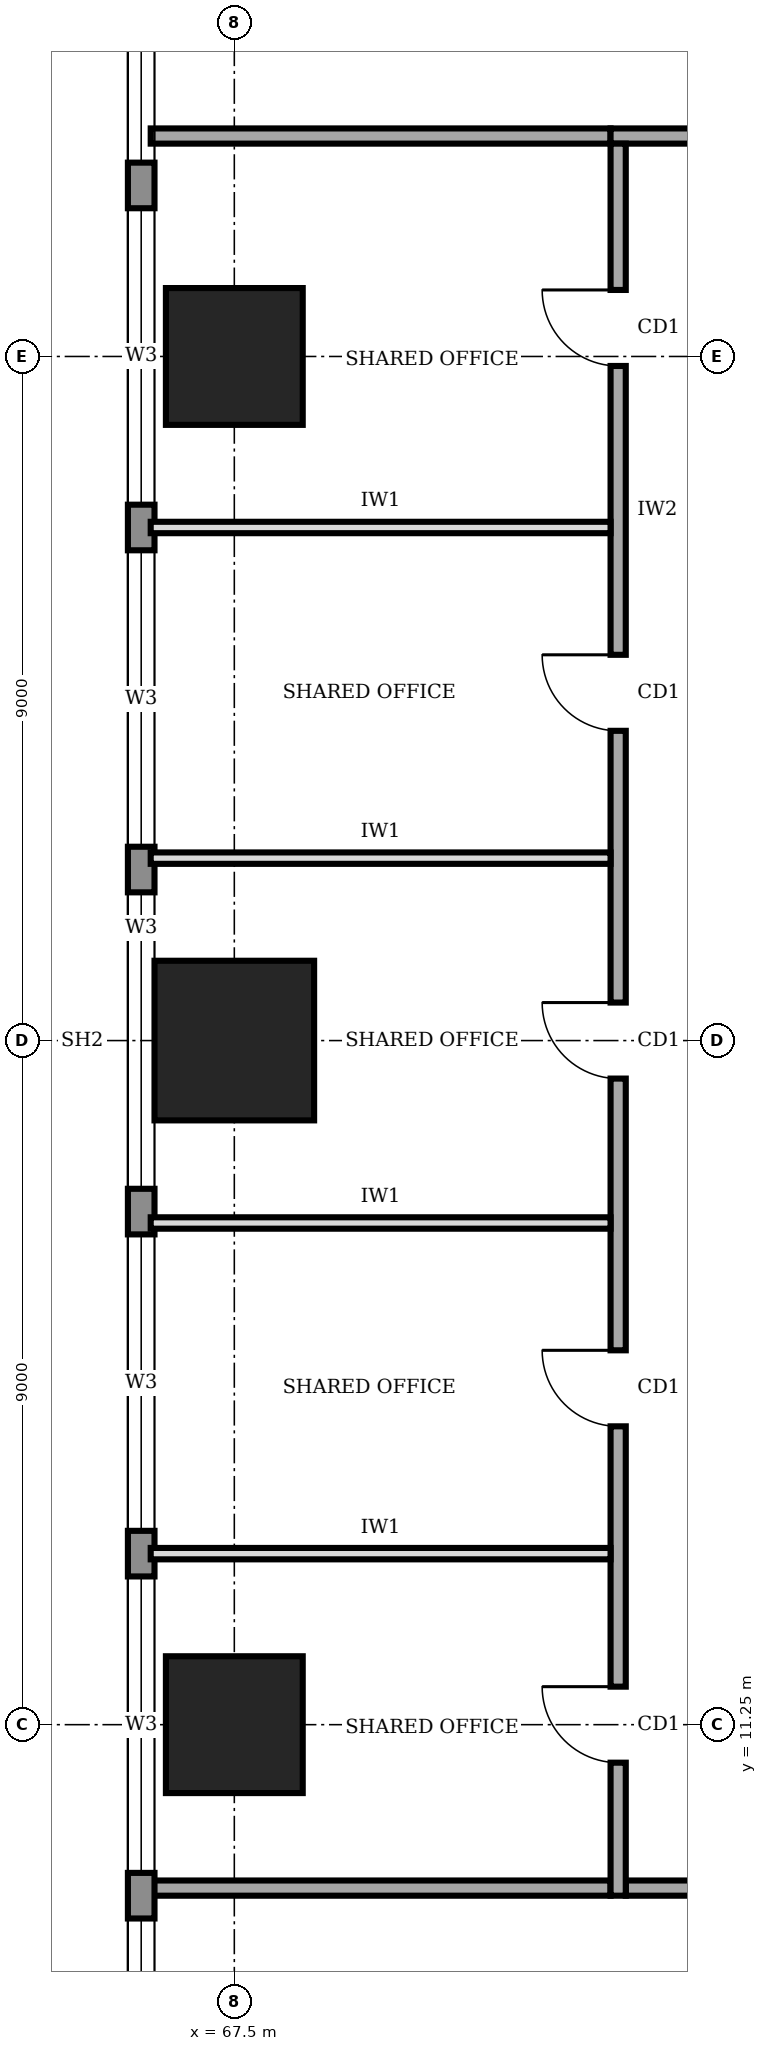
"""IFC4 building model, lengths in metres.
Left out: names, types, materials, properties, quantities, classifications, styles, units other than length and angle.
Written with IfcOpenShell. Run it as: python <this file> out.ifc"""

import sys

from ifc_helpers import new_model, si_unit, direction, frame, frame_2d, origin, origin_2d, place, context, subcontext, project, spatial, rectangle, extrude, element, fill, save


model = new_model("IFC4")
c1 = context("Model", 3, precision=1e-05, world=origin(), true_north=direction((0.0, 1.0)))
c2 = subcontext(c1, "Body", "Model", "MODEL_VIEW")
j1 = project(units=[si_unit("LENGTHUNIT", "METRE"), si_unit("PLANEANGLEUNIT", "RADIAN")], contexts=[c1])
p1 = place(None, origin())
s1 = spatial("IfcSite", under=j1, at=p1, CompositionType="ELEMENT")
p2 = place(p1, origin())
s2 = spatial("IfcBuilding", under=s1, at=p2, CompositionType="ELEMENT")
p3 = place(p2, frame((0.0, 0.0, 185.0)))
s3 = spatial("IfcBuildingStorey", under=s2, at=p3, CompositionType="ELEMENT", Elevation=185.0)
p4 = place(p3, frame((67.5, 11.25, 0.0), z_axis=(0.0, 0.0, 1.0), x_axis=(1.0, 0.0, 0.0)))
e1 = element("IfcColumn", 1, at=p4, inside=s3, PredefinedType="COLUMN", context=c2, shape_type="SweptSolid", body=[
    extrude(rectangle(XDim=1.8, YDim=1.8, at=origin_2d()), origin(), (0.0, 0.0, 1.0), 4.0),
])
p5 = place(p3, frame((67.5, 20.25, 0.0), z_axis=(0.0, 0.0, 1.0), x_axis=(1.0, 0.0, 0.0)))
e2 = element("IfcColumn", 2, at=p5, inside=s3, PredefinedType="COLUMN", context=c2, shape_type="SweptSolid", body=[
    extrude(rectangle(XDim=2.1, YDim=2.1, at=origin_2d()), origin(), (0.0, 0.0, 1.0), 4.0),
])
p6 = place(p3, frame((67.5, 29.25, 0.0), z_axis=(0.0, 0.0, 1.0), x_axis=(1.0, 0.0, 0.0)))
e3 = element("IfcColumn", 3, at=p6, inside=s3, PredefinedType="COLUMN", context=c2, shape_type="SweptSolid", body=[
    extrude(rectangle(XDim=1.8, YDim=1.8, at=origin_2d()), origin(), (0.0, 0.0, 1.0), 4.0),
])
p7 = place(p3, frame((66.275, 37.18, 0.0), z_axis=(0.0, 0.0, 1.0), x_axis=(0.0, -1.0, 0.0)))
e4 = element("IfcWall", 4, at=p7, inside=s3, PredefinedType="STANDARD", context=c2, shape_type="SweptSolid", body=[
    extrude(rectangle(XDim=33.86, YDim=0.35, at=frame_2d((16.93, 0.0))), origin(), (0.0, 0.0, 1.0), 3.75),
])
p8 = place(p7, frame((28.48, 0.0, 0.95)))
e5 = element("IfcOpeningElement", 5, at=p8, cuts=e4, PredefinedType="OPENING", context=c2, shape_type="SweptSolid", body=[
    extrude(rectangle(XDim=3.9, YDim=1.8, at=frame_2d((1.95, 0.9))), frame((0.0, 0.185, 0.0), z_axis=(0.0, -1.0, 0.0), x_axis=(1.0, 0.0, 0.0)), (0.0, 0.0, 1.0), 0.37),
])
p9 = place(p7, frame((23.98, 0.0, 0.95)))
e6 = element("IfcOpeningElement", 6, at=p9, cuts=e4, PredefinedType="OPENING", context=c2, shape_type="SweptSolid", body=[
    extrude(rectangle(XDim=3.9, YDim=1.8, at=frame_2d((1.95, 0.9))), frame((0.0, 0.185, 0.0), z_axis=(0.0, -1.0, 0.0), x_axis=(1.0, 0.0, 0.0)), (0.0, 0.0, 1.0), 0.37),
])
p10 = place(p7, frame((19.48, 0.0, 0.95)))
e7 = element("IfcOpeningElement", 7, at=p10, cuts=e4, PredefinedType="OPENING", context=c2, shape_type="SweptSolid", body=[
    extrude(rectangle(XDim=3.9, YDim=1.8, at=frame_2d((1.95, 0.9))), frame((0.0, 0.185, 0.0), z_axis=(0.0, -1.0, 0.0), x_axis=(1.0, 0.0, 0.0)), (0.0, 0.0, 1.0), 0.37),
])
p11 = place(p7, frame((14.98, 0.0, 0.95)))
e8 = element("IfcOpeningElement", 8, at=p11, cuts=e4, PredefinedType="OPENING", context=c2, shape_type="SweptSolid", body=[
    extrude(rectangle(XDim=3.9, YDim=1.8, at=frame_2d((1.95, 0.9))), frame((0.0, 0.185, 0.0), z_axis=(0.0, -1.0, 0.0), x_axis=(1.0, 0.0, 0.0)), (0.0, 0.0, 1.0), 0.37),
])
p12 = place(p7, frame((10.48, 0.0, 0.95)))
e9 = element("IfcOpeningElement", 9, at=p12, cuts=e4, PredefinedType="OPENING", context=c2, shape_type="SweptSolid", body=[
    extrude(rectangle(XDim=3.9, YDim=1.8, at=frame_2d((1.95, 0.9))), frame((0.0, 0.185, 0.0), z_axis=(0.0, -1.0, 0.0), x_axis=(1.0, 0.0, 0.0)), (0.0, 0.0, 1.0), 0.37),
])
p13 = place(p7, frame((5.98, 0.0, 0.95)))
e10 = element("IfcOpeningElement", 10, at=p13, cuts=e4, PredefinedType="OPENING", context=c2, shape_type="SweptSolid", body=[
    extrude(rectangle(XDim=3.9, YDim=1.8, at=frame_2d((1.95, 0.9))), frame((0.0, 0.185, 0.0), z_axis=(0.0, -1.0, 0.0), x_axis=(1.0, 0.0, 0.0)), (0.0, 0.0, 1.0), 0.37),
])
p14 = place(p7, frame((1.48, 0.0, 0.95)))
e11 = element("IfcOpeningElement", 11, at=p14, cuts=e4, PredefinedType="OPENING", context=c2, shape_type="SweptSolid", body=[
    extrude(rectangle(XDim=3.9, YDim=1.8, at=frame_2d((1.95, 0.9))), frame((0.0, 0.185, 0.0), z_axis=(0.0, -1.0, 0.0), x_axis=(1.0, 0.0, 0.0)), (0.0, 0.0, 1.0), 0.37),
])
p15 = place(p3, frame((72.65, 9.1, 0.0), z_axis=(0.0, 0.0, 1.0), x_axis=(1.0, 0.0, 0.0)))
e12 = element("IfcWall", 12, at=p15, inside=s3, PredefinedType="SOLIDWALL", context=c2, shape_type="SweptSolid", body=[
    extrude(rectangle(XDim=16.9, YDim=0.2, at=frame_2d((8.45, 0.0))), origin(), (0.0, 0.0, 1.0), 3.75),
])
p16 = place(p15, frame((1.325, 0.0, 0.0)))
e13 = element("IfcOpeningElement", 13, at=p16, cuts=e12, PredefinedType="OPENING", context=c2, shape_type="SweptSolid", body=[
    extrude(rectangle(XDim=1.0, YDim=2.1, at=frame_2d((0.5, 1.05))), frame((0.0, 0.11, 0.0), z_axis=(0.0, -1.0, 0.0), x_axis=(1.0, 0.0, 0.0)), (0.0, 0.0, 1.0), 0.22),
])
p17 = place(p15, frame((9.475, 0.0, 0.0)))
e14 = element("IfcOpeningElement", 14, at=p17, cuts=e12, PredefinedType="OPENING", context=c2, shape_type="SweptSolid", body=[
    extrude(rectangle(XDim=1.8, YDim=2.1, at=frame_2d((0.9, 1.05))), frame((0.0, 0.11, 0.0), z_axis=(0.0, -1.0, 0.0), x_axis=(1.0, 0.0, 0.0)), (0.0, 0.0, 1.0), 0.22),
])
p18 = place(p3, frame((89.35, 32.15, 0.0), z_axis=(0.0, 0.0, 1.0), x_axis=(-1.0, 0.0, 0.0)))
e15 = element("IfcWall", 15, at=p18, inside=s3, PredefinedType="SOLIDWALL", context=c2, shape_type="SweptSolid", body=[
    extrude(rectangle(XDim=16.9, YDim=0.2, at=frame_2d((8.45, 0.0))), origin(), (0.0, 0.0, 1.0), 3.75),
])
p19 = place(p18, frame((3.575, 0.0, 0.0)))
e16 = element("IfcOpeningElement", 16, at=p19, cuts=e15, PredefinedType="OPENING", context=c2, shape_type="SweptSolid", body=[
    extrude(rectangle(XDim=1.0, YDim=2.1, at=frame_2d((0.5, 1.05))), frame((0.0, 0.11, 0.0), z_axis=(0.0, -1.0, 0.0), x_axis=(1.0, 0.0, 0.0)), (0.0, 0.0, 1.0), 0.22),
])
p20 = place(p3, frame((72.55, 32.05, 0.0), z_axis=(0.0, 0.0, 1.0), x_axis=(0.0, -1.0, 0.0)))
e17 = element("IfcWall", 17, at=p20, inside=s3, PredefinedType="SOLIDWALL", context=c2, shape_type="SweptSolid", body=[
    extrude(rectangle(XDim=23.05, YDim=0.2, at=frame_2d((11.525, 0.0))), origin(), (0.0, 0.0, 1.0), 3.75),
])
p21 = place(p20, frame((20.3, 0.0, 0.0)))
e18 = element("IfcOpeningElement", 18, at=p21, cuts=e17, PredefinedType="OPENING", context=c2, shape_type="SweptSolid", body=[
    extrude(rectangle(XDim=1.0, YDim=2.1, at=frame_2d((0.5, 1.05))), frame((0.0, 0.11, 0.0), z_axis=(0.0, -1.0, 0.0), x_axis=(1.0, 0.0, 0.0)), (0.0, 0.0, 1.0), 0.22),
])
p22 = place(p20, frame((15.875, 0.0, 0.0)))
e19 = element("IfcOpeningElement", 19, at=p22, cuts=e17, PredefinedType="OPENING", context=c2, shape_type="SweptSolid", body=[
    extrude(rectangle(XDim=1.0, YDim=2.1, at=frame_2d((0.5, 1.05))), frame((0.0, 0.11, 0.0), z_axis=(0.0, -1.0, 0.0), x_axis=(1.0, 0.0, 0.0)), (0.0, 0.0, 1.0), 0.22),
])
p23 = place(p20, frame((11.3, 0.0, 0.0)))
e20 = element("IfcOpeningElement", 20, at=p23, cuts=e17, PredefinedType="OPENING", context=c2, shape_type="SweptSolid", body=[
    extrude(rectangle(XDim=1.0, YDim=2.1, at=frame_2d((0.5, 1.05))), frame((0.0, 0.11, 0.0), z_axis=(0.0, -1.0, 0.0), x_axis=(1.0, 0.0, 0.0)), (0.0, 0.0, 1.0), 0.22),
])
p24 = place(p20, frame((6.725, 0.0, 0.0)))
e21 = element("IfcOpeningElement", 21, at=p24, cuts=e17, PredefinedType="OPENING", context=c2, shape_type="SweptSolid", body=[
    extrude(rectangle(XDim=1.0, YDim=2.1, at=frame_2d((0.5, 1.05))), frame((0.0, 0.11, 0.0), z_axis=(0.0, -1.0, 0.0), x_axis=(1.0, 0.0, 0.0)), (0.0, 0.0, 1.0), 0.22),
])
p25 = place(p20, frame((1.925, 0.0, 0.0)))
e22 = element("IfcOpeningElement", 22, at=p25, cuts=e17, PredefinedType="OPENING", context=c2, shape_type="SweptSolid", body=[
    extrude(rectangle(XDim=1.0, YDim=2.1, at=frame_2d((0.5, 1.05))), frame((0.0, 0.11, 0.0), z_axis=(0.0, -1.0, 0.0), x_axis=(1.0, 0.0, 0.0)), (0.0, 0.0, 1.0), 0.22),
])
for number, where, z_axis, x_axis in (
    (23, (66.4, 9.1, 0.0), (0.0, 0.0, 1.0), (1.0, 0.0, 0.0)),
    (24, (66.4, 32.15, 0.0), (0.0, 0.0, 1.0), (1.0, 0.0, 0.0)),
):
    element("IfcWall", number, at=place(p3, frame(where, z_axis=z_axis, x_axis=x_axis)), inside=s3, PredefinedType="SOLIDWALL", context=c2, shape_type="SweptSolid", body=[
        extrude(rectangle(XDim=6.05, YDim=0.2, at=frame_2d((3.025, 0.0))), origin(), (0.0, 0.0, 1.0), 3.75),
    ])
for number, where, z_axis, x_axis in (
    (25, (66.4, 13.5, 0.0), (0.0, 0.0, 1.0), (1.0, 0.0, 0.0)),
    (26, (66.4, 17.85, 0.0), (0.0, 0.0, 1.0), (1.0, 0.0, 0.0)),
    (27, (66.4, 22.65, 0.0), (0.0, 0.0, 1.0), (1.0, 0.0, 0.0)),
    (28, (66.4, 27.0, 0.0), (0.0, 0.0, 1.0), (1.0, 0.0, 0.0)),
):
    element("IfcWall", number, at=place(p3, frame(where, z_axis=z_axis, x_axis=x_axis)), inside=s3, PredefinedType="PARTITIONING", context=c2, shape_type="SweptSolid", body=[
        extrude(rectangle(XDim=6.05, YDim=0.15, at=frame_2d((3.025, 0.0))), origin(), (0.0, 0.0, 1.0), 3.75),
    ])
p26 = place(p8, origin())
e29 = element("IfcWindow", 29, at=p26, inside=s3, PartitioningType="SINGLE_PANEL", PredefinedType="WINDOW", context=c2, shape_type="SweptSolid", body=[
    extrude(rectangle(XDim=3.9, YDim=1.8, at=frame_2d((1.95, 0.9))), frame((0.0, 0.03, 0.0), z_axis=(0.0, -1.0, 0.0), x_axis=(1.0, 0.0, 0.0)), (0.0, 0.0, 1.0), 0.06),
])
fill(e5, e29)
p27 = place(p9, origin())
e30 = element("IfcWindow", 30, at=p27, inside=s3, PartitioningType="SINGLE_PANEL", PredefinedType="WINDOW", context=c2, shape_type="SweptSolid", body=[
    extrude(rectangle(XDim=3.9, YDim=1.8, at=frame_2d((1.95, 0.9))), frame((0.0, 0.03, 0.0), z_axis=(0.0, -1.0, 0.0), x_axis=(1.0, 0.0, 0.0)), (0.0, 0.0, 1.0), 0.06),
])
fill(e6, e30)
p28 = place(p10, origin())
e31 = element("IfcWindow", 31, at=p28, inside=s3, PartitioningType="SINGLE_PANEL", PredefinedType="WINDOW", context=c2, shape_type="SweptSolid", body=[
    extrude(rectangle(XDim=3.9, YDim=1.8, at=frame_2d((1.95, 0.9))), frame((0.0, 0.03, 0.0), z_axis=(0.0, -1.0, 0.0), x_axis=(1.0, 0.0, 0.0)), (0.0, 0.0, 1.0), 0.06),
])
fill(e7, e31)
p29 = place(p11, origin())
e32 = element("IfcWindow", 32, at=p29, inside=s3, PartitioningType="SINGLE_PANEL", PredefinedType="WINDOW", context=c2, shape_type="SweptSolid", body=[
    extrude(rectangle(XDim=3.9, YDim=1.8, at=frame_2d((1.95, 0.9))), frame((0.0, 0.03, 0.0), z_axis=(0.0, -1.0, 0.0), x_axis=(1.0, 0.0, 0.0)), (0.0, 0.0, 1.0), 0.06),
])
fill(e8, e32)
p30 = place(p12, origin())
e33 = element("IfcWindow", 33, at=p30, inside=s3, PartitioningType="SINGLE_PANEL", PredefinedType="WINDOW", context=c2, shape_type="SweptSolid", body=[
    extrude(rectangle(XDim=3.9, YDim=1.8, at=frame_2d((1.95, 0.9))), frame((0.0, 0.03, 0.0), z_axis=(0.0, -1.0, 0.0), x_axis=(1.0, 0.0, 0.0)), (0.0, 0.0, 1.0), 0.06),
])
fill(e9, e33)
p31 = place(p13, origin())
e34 = element("IfcWindow", 34, at=p31, inside=s3, PartitioningType="SINGLE_PANEL", PredefinedType="WINDOW", context=c2, shape_type="SweptSolid", body=[
    extrude(rectangle(XDim=3.9, YDim=1.8, at=frame_2d((1.95, 0.9))), frame((0.0, 0.03, 0.0), z_axis=(0.0, -1.0, 0.0), x_axis=(1.0, 0.0, 0.0)), (0.0, 0.0, 1.0), 0.06),
])
fill(e10, e34)
p32 = place(p14, origin())
e35 = element("IfcWindow", 35, at=p32, inside=s3, PartitioningType="SINGLE_PANEL", PredefinedType="WINDOW", context=c2, shape_type="SweptSolid", body=[
    extrude(rectangle(XDim=3.9, YDim=1.8, at=frame_2d((1.95, 0.9))), frame((0.0, 0.03, 0.0), z_axis=(0.0, -1.0, 0.0), x_axis=(1.0, 0.0, 0.0)), (0.0, 0.0, 1.0), 0.06),
])
fill(e11, e35)
p33 = place(p21, frame((1.0, 0.0, 0.0), z_axis=(0.0, 0.0, 1.0), x_axis=(-1.0, 0.0, 0.0)))
e36 = element("IfcDoor", 36, at=p33, inside=s3, OperationType="SINGLE_SWING_RIGHT", PredefinedType="DOOR", context=c2, shape_type="SweptSolid", body=[
    extrude(rectangle(XDim=1.0, YDim=2.1, at=frame_2d((0.5, 1.05))), frame((0.0, 0.025, 0.0), z_axis=(0.0, -1.0, 0.0), x_axis=(1.0, 0.0, 0.0)), (0.0, 0.0, 1.0), 0.05),
])
fill(e18, e36)
p34 = place(p22, frame((1.0, 0.0, 0.0), z_axis=(0.0, 0.0, 1.0), x_axis=(-1.0, 0.0, 0.0)))
e37 = element("IfcDoor", 37, at=p34, inside=s3, OperationType="SINGLE_SWING_RIGHT", PredefinedType="DOOR", context=c2, shape_type="SweptSolid", body=[
    extrude(rectangle(XDim=1.0, YDim=2.1, at=frame_2d((0.5, 1.05))), frame((0.0, 0.025, 0.0), z_axis=(0.0, -1.0, 0.0), x_axis=(1.0, 0.0, 0.0)), (0.0, 0.0, 1.0), 0.05),
])
fill(e19, e37)
p35 = place(p23, frame((1.0, 0.0, 0.0), z_axis=(0.0, 0.0, 1.0), x_axis=(-1.0, 0.0, 0.0)))
e38 = element("IfcDoor", 38, at=p35, inside=s3, OperationType="SINGLE_SWING_RIGHT", PredefinedType="DOOR", context=c2, shape_type="SweptSolid", body=[
    extrude(rectangle(XDim=1.0, YDim=2.1, at=frame_2d((0.5, 1.05))), frame((0.0, 0.025, 0.0), z_axis=(0.0, -1.0, 0.0), x_axis=(1.0, 0.0, 0.0)), (0.0, 0.0, 1.0), 0.05),
])
fill(e20, e38)
p36 = place(p24, frame((1.0, 0.0, 0.0), z_axis=(0.0, 0.0, 1.0), x_axis=(-1.0, 0.0, 0.0)))
e39 = element("IfcDoor", 39, at=p36, inside=s3, OperationType="SINGLE_SWING_RIGHT", PredefinedType="DOOR", context=c2, shape_type="SweptSolid", body=[
    extrude(rectangle(XDim=1.0, YDim=2.1, at=frame_2d((0.5, 1.05))), frame((0.0, 0.025, 0.0), z_axis=(0.0, -1.0, 0.0), x_axis=(1.0, 0.0, 0.0)), (0.0, 0.0, 1.0), 0.05),
])
fill(e21, e39)
p37 = place(p25, frame((1.0, 0.0, 0.0), z_axis=(0.0, 0.0, 1.0), x_axis=(-1.0, 0.0, 0.0)))
e40 = element("IfcDoor", 40, at=p37, inside=s3, OperationType="SINGLE_SWING_RIGHT", PredefinedType="DOOR", context=c2, shape_type="SweptSolid", body=[
    extrude(rectangle(XDim=1.0, YDim=2.1, at=frame_2d((0.5, 1.05))), frame((0.0, 0.025, 0.0), z_axis=(0.0, -1.0, 0.0), x_axis=(1.0, 0.0, 0.0)), (0.0, 0.0, 1.0), 0.05),
])
fill(e22, e40)
save(model, sys.argv[1])
